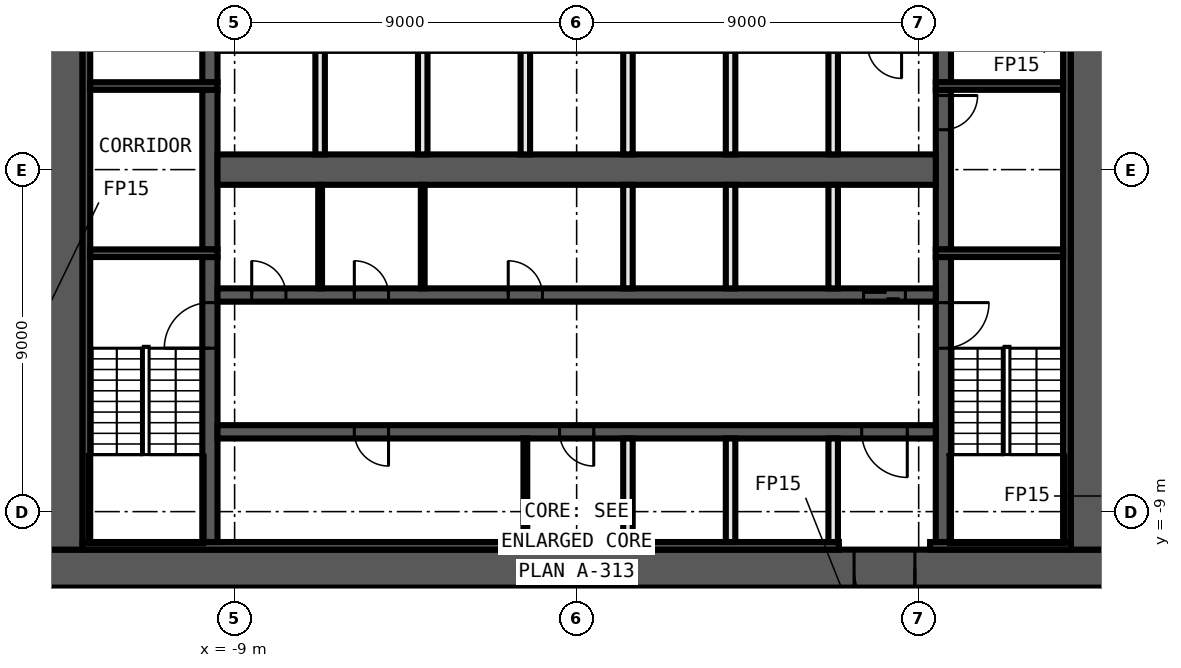
"""IFC4 building model, lengths in metres.
Left out: names, types, materials, properties, quantities, classifications, styles, units other than length and angle.
Written with IfcOpenShell. Run it as: python <this file> out.ifc"""

import sys

from ifc_helpers import new_model, si_unit, direction, frame, frame_2d, origin, place, context, subcontext, project, spatial, rectangle, extrude, element, fill, save


model = new_model("IFC4")
c1 = context("Model", 3, precision=1e-05, world=origin(), true_north=direction((0.0, 1.0)))
c2 = subcontext(c1, "Body", "Model", "MODEL_VIEW")
j1 = project(units=[si_unit("LENGTHUNIT", "METRE"), si_unit("PLANEANGLEUNIT", "RADIAN")], contexts=[c1])
p1 = place(None, origin())
s1 = spatial("IfcSite", under=j1, at=p1, CompositionType="ELEMENT")
p2 = place(p1, origin())
s2 = spatial("IfcBuilding", under=s1, at=p2, CompositionType="ELEMENT")
p3 = place(p2, frame((0.0, 0.0, 95.2)))
s3 = spatial("IfcBuildingStorey", under=s2, at=p3, CompositionType="ELEMENT", Elevation=95.2)
p4 = place(p3, frame((14.0, -10.5, 0.0), z_axis=(0.0, 0.0, 1.0), x_axis=(-1.0, 0.0, 0.0)))
e1 = element("IfcWall", 1, at=p4, inside=s3, PredefinedType="SHEAR", context=c2, shape_type="SweptSolid", body=[
    extrude(rectangle(XDim=28.0, YDim=1.0, at=frame_2d((14.0, 0.0))), origin(), (0.0, 0.0, 1.0), 3.25),
])
p5 = place(p4, frame((5.1, 0.0, 0.0)))
e2 = element("IfcOpeningElement", 2, at=p5, cuts=e1, PredefinedType="OPENING", context=c2, shape_type="SweptSolid", body=[
    extrude(rectangle(XDim=1.6, YDim=2.1, at=frame_2d((0.8, 1.05))), frame((0.0, 0.51, 0.0), z_axis=(0.0, -1.0, 0.0), x_axis=(1.0, 0.0, 0.0)), (0.0, 0.0, 1.0), 1.02),
])
for number, where, z_axis, x_axis in (
    (3, (13.5, 10.0, 0.0), (0.0, 0.0, 1.0), (0.0, -1.0, 0.0)),
    (4, (-13.5, -10.0, 0.0), (0.0, 0.0, 1.0), (0.0, 1.0, 0.0)),
):
    element("IfcWall", number, at=place(p3, frame(where, z_axis=z_axis, x_axis=x_axis)), inside=s3, PredefinedType="SHEAR", context=c2, shape_type="SweptSolid", body=[
        extrude(rectangle(XDim=20.0, YDim=1.0, at=frame_2d((10.0, 0.0))), origin(), (0.0, 0.0, 1.0), 3.25),
    ])
p6 = place(p3, frame((13.0, -9.9, 0.0), z_axis=(0.0, 0.0, 1.0), x_axis=(-1.0, 0.0, 0.0)))
e5 = element("IfcWall", 5, at=p6, inside=s3, PredefinedType="SHEAR", context=c2, shape_type="SweptSolid", body=[
    extrude(rectangle(XDim=3.7, YDim=0.2, at=frame_2d((1.85, 0.0))), origin(), (0.0, 0.0, 1.0), 3.25),
])
p7 = place(p3, frame((6.9, -9.9, 0.0), z_axis=(0.0, 0.0, 1.0), x_axis=(-1.0, 0.0, 0.0)))
e6 = element("IfcWall", 6, at=p7, inside=s3, PredefinedType="SHEAR", context=c2, shape_type="SweptSolid", body=[
    extrude(rectangle(XDim=19.9, YDim=0.2, at=frame_2d((9.95, 0.0))), origin(), (0.0, 0.0, 1.0), 3.25),
])
for number, where, z_axis, x_axis in (
    (7, (12.9, 9.8, 0.0), (0.0, 0.0, 1.0), (0.0, -1.0, 0.0)),
    (8, (-12.9, -9.8, 0.0), (0.0, 0.0, 1.0), (0.0, 1.0, 0.0)),
):
    element("IfcWall", number, at=place(p3, frame(where, z_axis=z_axis, x_axis=x_axis)), inside=s3, PredefinedType="SHEAR", context=c2, shape_type="SweptSolid", body=[
        extrude(rectangle(XDim=19.6, YDim=0.2, at=frame_2d((9.8, 0.0))), origin(), (0.0, 0.0, 1.0), 3.25),
    ])
p8 = place(p3, frame((9.65, -2.3, 0.0), z_axis=(0.0, 0.0, 1.0), x_axis=(0.0, -1.0, 0.0)))
e9 = element("IfcWall", 9, at=p8, inside=s3, PredefinedType="SHEAR", context=c2, shape_type="SweptSolid", body=[
    extrude(rectangle(XDim=7.5, YDim=0.4, at=frame_2d((3.75, 0.0))), origin(), (0.0, 0.0, 1.0), 3.25),
])
p9 = place(p8, frame((1.2, 0.0, 0.0)))
e10 = element("IfcOpeningElement", 10, at=p9, cuts=e9, PredefinedType="OPENING", context=c2, shape_type="SweptSolid", body=[
    extrude(rectangle(XDim=1.2, YDim=2.1, at=frame_2d((0.6, 1.05))), frame((0.0, 0.21, 0.0), z_axis=(0.0, -1.0, 0.0), x_axis=(1.0, 0.0, 0.0)), (0.0, 0.0, 1.0), 0.42),
])
p10 = place(p3, frame((9.65, 2.1, 0.0), z_axis=(0.0, 0.0, 1.0), x_axis=(0.0, -1.0, 0.0)))
e11 = element("IfcWall", 11, at=p10, inside=s3, PredefinedType="SHEAR", context=c2, shape_type="SweptSolid", body=[
    extrude(rectangle(XDim=4.2, YDim=0.4, at=frame_2d((2.1, 0.0))), origin(), (0.0, 0.0, 1.0), 3.25),
])
p11 = place(p10, frame((0.15, 0.0, 0.0)))
e12 = element("IfcOpeningElement", 12, at=p11, cuts=e11, PredefinedType="OPENING", context=c2, shape_type="SweptSolid", body=[
    extrude(rectangle(XDim=0.9, YDim=2.1, at=frame_2d((0.45, 1.05))), frame((0.0, 0.21, 0.0), z_axis=(0.0, -1.0, 0.0), x_axis=(1.0, 0.0, 0.0)), (0.0, 0.0, 1.0), 0.42),
])
p12 = place(p3, frame((9.65, 9.8, 0.0), z_axis=(0.0, 0.0, 1.0), x_axis=(0.0, -1.0, 0.0)))
e13 = element("IfcWall", 13, at=p12, inside=s3, PredefinedType="SHEAR", context=c2, shape_type="SweptSolid", body=[
    extrude(rectangle(XDim=7.5, YDim=0.4, at=frame_2d((3.75, 0.0))), origin(), (0.0, 0.0, 1.0), 3.25),
])
p13 = place(p12, frame((5.1, 0.0, 0.0)))
e14 = element("IfcOpeningElement", 14, at=p13, cuts=e13, PredefinedType="OPENING", context=c2, shape_type="SweptSolid", body=[
    extrude(rectangle(XDim=1.2, YDim=2.1, at=frame_2d((0.6, 1.05))), frame((0.0, 0.21, 0.0), z_axis=(0.0, -1.0, 0.0), x_axis=(1.0, 0.0, 0.0)), (0.0, 0.0, 1.0), 0.42),
])
p14 = place(p3, frame((-9.65, -9.8, 0.0), z_axis=(0.0, 0.0, 1.0), x_axis=(0.0, 1.0, 0.0)))
e15 = element("IfcWall", 15, at=p14, inside=s3, PredefinedType="SHEAR", context=c2, shape_type="SweptSolid", body=[
    extrude(rectangle(XDim=7.5, YDim=0.4, at=frame_2d((3.75, 0.0))), origin(), (0.0, 0.0, 1.0), 3.25),
])
p15 = place(p14, frame((5.1, 0.0, 0.0)))
e16 = element("IfcOpeningElement", 16, at=p15, cuts=e15, PredefinedType="OPENING", context=c2, shape_type="SweptSolid", body=[
    extrude(rectangle(XDim=1.2, YDim=2.1, at=frame_2d((0.6, 1.05))), frame((0.0, 0.21, 0.0), z_axis=(0.0, -1.0, 0.0), x_axis=(1.0, 0.0, 0.0)), (0.0, 0.0, 1.0), 0.42),
])
p16 = place(p3, frame((-9.65, -2.1, 0.0), z_axis=(0.0, 0.0, 1.0), x_axis=(0.0, 1.0, 0.0)))
e17 = element("IfcWall", 17, at=p16, inside=s3, PredefinedType="SHEAR", context=c2, shape_type="SweptSolid", body=[
    extrude(rectangle(XDim=4.2, YDim=0.4, at=frame_2d((2.1, 0.0))), origin(), (0.0, 0.0, 1.0), 3.25),
])
p17 = place(p3, frame((-9.65, 2.3, 0.0), z_axis=(0.0, 0.0, 1.0), x_axis=(0.0, 1.0, 0.0)))
e18 = element("IfcWall", 18, at=p17, inside=s3, PredefinedType="SHEAR", context=c2, shape_type="SweptSolid", body=[
    extrude(rectangle(XDim=7.5, YDim=0.4, at=frame_2d((3.75, 0.0))), origin(), (0.0, 0.0, 1.0), 3.25),
])
p18 = place(p17, frame((1.2, 0.0, 0.0)))
e19 = element("IfcOpeningElement", 19, at=p18, cuts=e18, PredefinedType="OPENING", context=c2, shape_type="SweptSolid", body=[
    extrude(rectangle(XDim=1.2, YDim=2.1, at=frame_2d((0.6, 1.05))), frame((0.0, 0.21, 0.0), z_axis=(0.0, -1.0, 0.0), x_axis=(1.0, 0.0, 0.0)), (0.0, 0.0, 1.0), 0.42),
])
for number, where, z_axis, x_axis in (
    (20, (9.45, 2.2, 0.0), (0.0, 0.0, 1.0), (1.0, 0.0, 0.0)),
    (21, (-9.45, 2.2, 0.0), (0.0, 0.0, 1.0), (-1.0, 0.0, 0.0)),
    (22, (9.45, -2.2, 0.0), (0.0, 0.0, 1.0), (1.0, 0.0, 0.0)),
    (23, (-9.45, -2.2, 0.0), (0.0, 0.0, 1.0), (-1.0, 0.0, 0.0)),
):
    element("IfcWall", number, at=place(p3, frame(where, z_axis=z_axis, x_axis=x_axis)), inside=s3, PredefinedType="SHEAR", context=c2, shape_type="SweptSolid", body=[
        extrude(rectangle(XDim=3.35, YDim=0.2, at=frame_2d((1.675, 0.0))), origin(), (0.0, 0.0, 1.0), 3.25),
    ])
p19 = place(p3, frame((-9.45, -3.3, 0.0), z_axis=(0.0, 0.0, 1.0), x_axis=(1.0, 0.0, 0.0)))
e24 = element("IfcWall", 24, at=p19, inside=s3, PredefinedType="SHEAR", context=c2, shape_type="SweptSolid", body=[
    extrude(rectangle(XDim=18.9, YDim=0.35, at=frame_2d((9.45, 0.0))), origin(), (0.0, 0.0, 1.0), 3.25),
])
p20 = place(p19, frame((17.0, 0.0, 0.0)))
e25 = element("IfcOpeningElement", 25, at=p20, cuts=e24, PredefinedType="OPENING", context=c2, shape_type="SweptSolid", body=[
    extrude(rectangle(XDim=1.1, YDim=2.1, at=frame_2d((0.55, 1.05))), frame((0.0, 0.185, 0.0), z_axis=(0.0, -1.0, 0.0), x_axis=(1.0, 0.0, 0.0)), (0.0, 0.0, 1.0), 0.37),
])
p21 = place(p19, frame((0.9, 0.0, 0.0)))
e26 = element("IfcOpeningElement", 26, at=p21, cuts=e24, PredefinedType="OPENING", context=c2, shape_type="SweptSolid", body=[
    extrude(rectangle(XDim=0.9, YDim=2.1, at=frame_2d((0.45, 1.05))), frame((0.0, 0.185, 0.0), z_axis=(0.0, -1.0, 0.0), x_axis=(1.0, 0.0, 0.0)), (0.0, 0.0, 1.0), 0.37),
])
p22 = place(p19, frame((3.6, 0.0, 0.0)))
e27 = element("IfcOpeningElement", 27, at=p22, cuts=e24, PredefinedType="OPENING", context=c2, shape_type="SweptSolid", body=[
    extrude(rectangle(XDim=0.9, YDim=2.1, at=frame_2d((0.45, 1.05))), frame((0.0, 0.185, 0.0), z_axis=(0.0, -1.0, 0.0), x_axis=(1.0, 0.0, 0.0)), (0.0, 0.0, 1.0), 0.37),
])
p23 = place(p19, frame((7.65, 0.0, 0.0)))
e28 = element("IfcOpeningElement", 28, at=p23, cuts=e24, PredefinedType="OPENING", context=c2, shape_type="SweptSolid", body=[
    extrude(rectangle(XDim=0.9, YDim=2.1, at=frame_2d((0.45, 1.05))), frame((0.0, 0.185, 0.0), z_axis=(0.0, -1.0, 0.0), x_axis=(1.0, 0.0, 0.0)), (0.0, 0.0, 1.0), 0.37),
])
p24 = place(p3, frame((9.45, -6.9, 0.0), z_axis=(0.0, 0.0, 1.0), x_axis=(-1.0, 0.0, 0.0)))
e29 = element("IfcWall", 29, at=p24, inside=s3, PredefinedType="SHEAR", context=c2, shape_type="SweptSolid", body=[
    extrude(rectangle(XDim=18.9, YDim=0.35, at=frame_2d((9.45, 0.0))), origin(), (0.0, 0.0, 1.0), 3.25),
])
p25 = place(p24, frame((0.75, 0.0, 0.0)))
e30 = element("IfcOpeningElement", 30, at=p25, cuts=e29, PredefinedType="OPENING", context=c2, shape_type="SweptSolid", body=[
    extrude(rectangle(XDim=1.2, YDim=2.1, at=frame_2d((0.6, 1.05))), frame((0.0, 0.185, 0.0), z_axis=(0.0, -1.0, 0.0), x_axis=(1.0, 0.0, 0.0)), (0.0, 0.0, 1.0), 0.37),
])
p26 = place(p24, frame((14.4, 0.0, 0.0)))
e31 = element("IfcOpeningElement", 31, at=p26, cuts=e29, PredefinedType="OPENING", context=c2, shape_type="SweptSolid", body=[
    extrude(rectangle(XDim=0.9, YDim=2.1, at=frame_2d((0.45, 1.05))), frame((0.0, 0.185, 0.0), z_axis=(0.0, -1.0, 0.0), x_axis=(1.0, 0.0, 0.0)), (0.0, 0.0, 1.0), 0.37),
])
p27 = place(p24, frame((9.0, 0.0, 0.0)))
e32 = element("IfcOpeningElement", 32, at=p27, cuts=e29, PredefinedType="OPENING", context=c2, shape_type="SweptSolid", body=[
    extrude(rectangle(XDim=0.9, YDim=2.1, at=frame_2d((0.45, 1.05))), frame((0.0, 0.185, 0.0), z_axis=(0.0, -1.0, 0.0), x_axis=(1.0, 0.0, 0.0)), (0.0, 0.0, 1.0), 0.37),
])
p28 = place(p3, frame((-9.45, 0.0, 0.0), z_axis=(0.0, 0.0, 1.0), x_axis=(1.0, 0.0, 0.0)))
e33 = element("IfcWall", 33, at=p28, inside=s3, PredefinedType="SHEAR", context=c2, shape_type="SweptSolid", body=[
    extrude(rectangle(XDim=18.9, YDim=0.8, at=frame_2d((9.45, 0.0))), origin(), (0.0, 0.0, 1.0), 3.25),
])
for number, where, z_axis, x_axis in (
    (34, (6.75, -9.8, 0.0), (0.0, 0.0, 1.0), (0.0, 1.0, 0.0)),
    (35, (6.75, -3.125, 0.0), (0.0, 0.0, 1.0), (0.0, 1.0, 0.0)),
    (36, (6.75, 0.4, 0.0), (0.0, 0.0, 1.0), (0.0, 1.0, 0.0)),
    (37, (4.05, -9.8, 0.0), (0.0, 0.0, 1.0), (0.0, 1.0, 0.0)),
    (38, (4.05, -3.125, 0.0), (0.0, 0.0, 1.0), (0.0, 1.0, 0.0)),
    (39, (4.05, 0.4, 0.0), (0.0, 0.0, 1.0), (0.0, 1.0, 0.0)),
    (40, (1.35, -9.8, 0.0), (0.0, 0.0, 1.0), (0.0, 1.0, 0.0)),
    (41, (1.35, -3.125, 0.0), (0.0, 0.0, 1.0), (0.0, 1.0, 0.0)),
    (42, (1.35, 0.4, 0.0), (0.0, 0.0, 1.0), (0.0, 1.0, 0.0)),
):
    element("IfcWall", number, at=place(p3, frame(where, z_axis=z_axis, x_axis=x_axis)), inside=s3, PredefinedType="SOLIDWALL", context=c2, shape_type="SweptSolid", body=[
        extrude(rectangle(XDim=2.725, YDim=0.25, at=frame_2d((1.363, 0.0))), origin(), (0.0, 0.0, 1.0), 3.25),
    ])
p29 = place(p3, frame((-1.35, -9.8, 0.0), z_axis=(0.0, 0.0, 1.0), x_axis=(0.0, 1.0, 0.0)))
e43 = element("IfcWall", 43, at=p29, inside=s3, PredefinedType="PARTITIONING", context=c2, shape_type="SweptSolid", body=[
    extrude(rectangle(XDim=2.725, YDim=0.1, at=frame_2d((1.363, 0.0))), origin(), (0.0, 0.0, 1.0), 3.25),
])
p30 = place(p3, frame((-1.35, 0.4, 0.0), z_axis=(0.0, 0.0, 1.0), x_axis=(0.0, 1.0, 0.0)))
e44 = element("IfcWall", 44, at=p30, inside=s3, PredefinedType="SOLIDWALL", context=c2, shape_type="SweptSolid", body=[
    extrude(rectangle(XDim=2.725, YDim=0.25, at=frame_2d((1.363, 0.0))), origin(), (0.0, 0.0, 1.0), 3.25),
])
p31 = place(p3, frame((-4.05, -3.125, 0.0), z_axis=(0.0, 0.0, 1.0), x_axis=(0.0, 1.0, 0.0)))
e45 = element("IfcWall", 45, at=p31, inside=s3, PredefinedType="PARTITIONING", context=c2, shape_type="SweptSolid", body=[
    extrude(rectangle(XDim=2.725, YDim=0.1, at=frame_2d((1.363, 0.0))), origin(), (0.0, 0.0, 1.0), 3.25),
])
p32 = place(p3, frame((-4.05, 0.4, 0.0), z_axis=(0.0, 0.0, 1.0), x_axis=(0.0, 1.0, 0.0)))
e46 = element("IfcWall", 46, at=p32, inside=s3, PredefinedType="SOLIDWALL", context=c2, shape_type="SweptSolid", body=[
    extrude(rectangle(XDim=2.725, YDim=0.25, at=frame_2d((1.363, 0.0))), origin(), (0.0, 0.0, 1.0), 3.25),
])
p33 = place(p3, frame((-6.75, -3.125, 0.0), z_axis=(0.0, 0.0, 1.0), x_axis=(0.0, 1.0, 0.0)))
e47 = element("IfcWall", 47, at=p33, inside=s3, PredefinedType="PARTITIONING", context=c2, shape_type="SweptSolid", body=[
    extrude(rectangle(XDim=2.725, YDim=0.1, at=frame_2d((1.363, 0.0))), origin(), (0.0, 0.0, 1.0), 3.25),
])
p34 = place(p3, frame((-6.75, 0.4, 0.0), z_axis=(0.0, 0.0, 1.0), x_axis=(0.0, 1.0, 0.0)))
e48 = element("IfcWall", 48, at=p34, inside=s3, PredefinedType="SOLIDWALL", context=c2, shape_type="SweptSolid", body=[
    extrude(rectangle(XDim=2.725, YDim=0.25, at=frame_2d((1.363, 0.0))), origin(), (0.0, 0.0, 1.0), 3.25),
])
p35 = place(p11, origin())
e49 = element("IfcDoor", 49, at=p35, inside=s3, OperationType="SINGLE_SWING_RIGHT", PredefinedType="DOOR", context=c2, shape_type="SweptSolid", body=[
    extrude(rectangle(XDim=0.9, YDim=2.1, at=frame_2d((0.45, 1.05))), frame((0.0, 0.025, 0.0), z_axis=(0.0, -1.0, 0.0), x_axis=(1.0, 0.0, 0.0)), (0.0, 0.0, 1.0), 0.05),
])
fill(e12, e49)
p36 = place(p20, origin())
e50 = element("IfcDoor", 50, at=p36, inside=s3, OperationType="DOUBLE_DOOR_SLIDING", PredefinedType="DOOR", context=c2, shape_type="SweptSolid", body=[
    extrude(rectangle(XDim=1.1, YDim=2.1, at=frame_2d((0.55, 1.05))), frame((0.0, 0.025, 0.0), z_axis=(0.0, -1.0, 0.0), x_axis=(1.0, 0.0, 0.0)), (0.0, 0.0, 1.0), 0.05),
])
fill(e25, e50)
p37 = place(p5, origin())
e51 = element("IfcDoor", 51, at=p37, inside=s3, OperationType="DOUBLE_DOOR_SINGLE_SWING", PredefinedType="DOOR", context=c2, shape_type="SweptSolid", body=[
    extrude(rectangle(XDim=1.6, YDim=2.1, at=frame_2d((0.8, 1.05))), frame((0.0, 0.025, 0.0), z_axis=(0.0, -1.0, 0.0), x_axis=(1.0, 0.0, 0.0)), (0.0, 0.0, 1.0), 0.05),
])
fill(e2, e51)
p38 = place(p25, origin())
e52 = element("IfcDoor", 52, at=p38, inside=s3, OperationType="SINGLE_SWING_LEFT", PredefinedType="DOOR", context=c2, shape_type="SweptSolid", body=[
    extrude(rectangle(XDim=1.2, YDim=2.1, at=frame_2d((0.6, 1.05))), frame((0.0, 0.025, 0.0), z_axis=(0.0, -1.0, 0.0), x_axis=(1.0, 0.0, 0.0)), (0.0, 0.0, 1.0), 0.05),
])
fill(e30, e52)
p39 = place(p21, origin())
e53 = element("IfcDoor", 53, at=p39, inside=s3, OperationType="SINGLE_SWING_RIGHT", PredefinedType="DOOR", context=c2, shape_type="SweptSolid", body=[
    extrude(rectangle(XDim=0.9, YDim=2.1, at=frame_2d((0.45, 1.05))), frame((0.0, 0.025, 0.0), z_axis=(0.0, -1.0, 0.0), x_axis=(1.0, 0.0, 0.0)), (0.0, 0.0, 1.0), 0.05),
])
fill(e26, e53)
p40 = place(p22, origin())
e54 = element("IfcDoor", 54, at=p40, inside=s3, OperationType="SINGLE_SWING_LEFT", PredefinedType="DOOR", context=c2, shape_type="SweptSolid", body=[
    extrude(rectangle(XDim=0.9, YDim=2.1, at=frame_2d((0.45, 1.05))), frame((0.0, 0.025, 0.0), z_axis=(0.0, -1.0, 0.0), x_axis=(1.0, 0.0, 0.0)), (0.0, 0.0, 1.0), 0.05),
])
fill(e27, e54)
p41 = place(p23, origin())
e55 = element("IfcDoor", 55, at=p41, inside=s3, OperationType="SINGLE_SWING_RIGHT", PredefinedType="DOOR", context=c2, shape_type="SweptSolid", body=[
    extrude(rectangle(XDim=0.9, YDim=2.1, at=frame_2d((0.45, 1.05))), frame((0.0, 0.025, 0.0), z_axis=(0.0, -1.0, 0.0), x_axis=(1.0, 0.0, 0.0)), (0.0, 0.0, 1.0), 0.05),
])
fill(e28, e55)
p42 = place(p26, origin())
e56 = element("IfcDoor", 56, at=p42, inside=s3, OperationType="SINGLE_SWING_LEFT", PredefinedType="DOOR", context=c2, shape_type="SweptSolid", body=[
    extrude(rectangle(XDim=0.9, YDim=2.1, at=frame_2d((0.45, 1.05))), frame((0.0, 0.025, 0.0), z_axis=(0.0, -1.0, 0.0), x_axis=(1.0, 0.0, 0.0)), (0.0, 0.0, 1.0), 0.05),
])
fill(e31, e56)
p43 = place(p27, origin())
e57 = element("IfcDoor", 57, at=p43, inside=s3, OperationType="SINGLE_SWING_RIGHT", PredefinedType="DOOR", context=c2, shape_type="SweptSolid", body=[
    extrude(rectangle(XDim=0.9, YDim=2.1, at=frame_2d((0.45, 1.05))), frame((0.0, 0.025, 0.0), z_axis=(0.0, -1.0, 0.0), x_axis=(1.0, 0.0, 0.0)), (0.0, 0.0, 1.0), 0.05),
])
fill(e32, e57)
p44 = place(p9, origin())
e58 = element("IfcDoor", 58, at=p44, inside=s3, OperationType="SINGLE_SWING_RIGHT", PredefinedType="DOOR", context=c2, shape_type="SweptSolid", body=[
    extrude(rectangle(XDim=1.2, YDim=2.1, at=frame_2d((0.6, 1.05))), frame((0.0, 0.025, 0.0), z_axis=(0.0, -1.0, 0.0), x_axis=(1.0, 0.0, 0.0)), (0.0, 0.0, 1.0), 0.05),
])
fill(e10, e58)
p45 = place(p15, origin())
e59 = element("IfcDoor", 59, at=p45, inside=s3, OperationType="SINGLE_SWING_LEFT", PredefinedType="DOOR", context=c2, shape_type="SweptSolid", body=[
    extrude(rectangle(XDim=1.2, YDim=2.1, at=frame_2d((0.6, 1.05))), frame((0.0, 0.025, 0.0), z_axis=(0.0, -1.0, 0.0), x_axis=(1.0, 0.0, 0.0)), (0.0, 0.0, 1.0), 0.05),
])
fill(e16, e59)
save(model, sys.argv[1])
